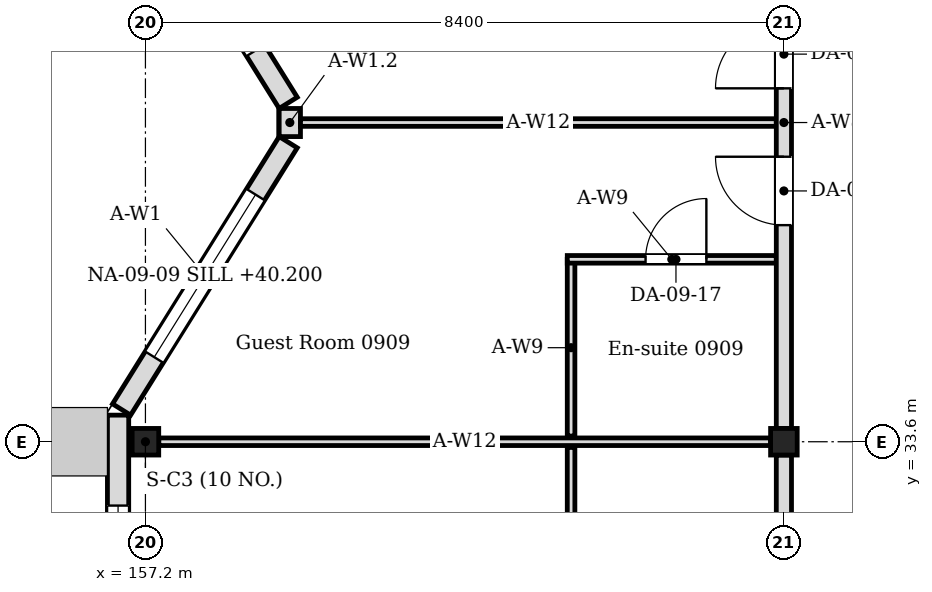
"""IFC4 building model, lengths in metres.
Left out: names, types, materials, properties, quantities, classifications, styles, units other than length and angle.
Written with IfcOpenShell. Run it as: python <this file> out.ifc"""

import sys

from ifc_helpers import new_model, si_unit, direction, frame, frame_2d, origin, origin_2d, place, context, subcontext, project, spatial, rectangle, i_section, extrude, element, fill, save


model = new_model("IFC4")
c1 = context("Model", 3, precision=1e-05, world=origin(), true_north=direction((0.0, 1.0)))
c2 = subcontext(c1, "Body", "Model", "MODEL_VIEW")
j1 = project(units=[si_unit("LENGTHUNIT", "METRE"), si_unit("PLANEANGLEUNIT", "RADIAN")], contexts=[c1])
p1 = place(None, origin())
s1 = spatial("IfcSite", under=j1, at=p1, CompositionType="ELEMENT")
p2 = place(p1, origin())
s2 = spatial("IfcBuilding", under=s1, at=p2, CompositionType="ELEMENT")
p3 = place(p2, frame((0.0, 0.0, 39.6)))
s3 = spatial("IfcBuildingStorey", under=s2, at=p3, CompositionType="ELEMENT", Elevation=39.6)
for number, where, z_axis, x_axis in (
    (1, (157.2, 33.6, 0.0), (0.0, 0.0, 1.0), (1.0, 0.0, 0.0)),
    (2, (165.6, 33.6, 0.0), (0.0, 0.0, 1.0), (1.0, 0.0, 0.0)),
):
    element("IfcColumn", number, at=place(p3, frame(where, z_axis=z_axis, x_axis=x_axis)), inside=s3, PredefinedType="COLUMN", context=c2, shape_type="SweptSolid", body=[
        extrude(i_section(OverallWidth=0.35, OverallDepth=0.35, WebThickness=0.012, FlangeThickness=0.019, FilletRadius=0.013, at=origin_2d()), origin(), (0.0, 0.0, 1.0), 4.2),
    ])
p4 = place(p3, frame((156.84, 24.85, 0.0), z_axis=(0.0, 0.0, 1.0), x_axis=(0.0, 1.0, 0.0)))
e3 = element("IfcWall", 3, at=p4, inside=s3, PredefinedType="SOLIDWALL", context=c2, shape_type="SweptSolid", body=[
    extrude(rectangle(XDim=9.1, YDim=0.28, at=frame_2d((4.55, 0.0))), origin(), (0.0, 0.0, 1.0), 4.05),
])
p5 = place(p4, frame((1.19, 0.0, 0.6)))
e4 = element("IfcOpeningElement", 4, at=p5, cuts=e3, PredefinedType="OPENING", context=c2, shape_type="SweptSolid", body=[
    extrude(rectangle(XDim=2.52, YDim=2.4, at=frame_2d((1.26, 1.2))), frame((0.0, 0.15, 0.0), z_axis=(0.0, -1.0, 0.0), x_axis=(1.0, 0.0, 0.0)), (0.0, 0.0, 1.0), 0.3),
])
p6 = place(p4, frame((5.39, 0.0, 0.6)))
e5 = element("IfcOpeningElement", 5, at=p6, cuts=e3, PredefinedType="OPENING", context=c2, shape_type="SweptSolid", body=[
    extrude(rectangle(XDim=2.52, YDim=2.4, at=frame_2d((1.26, 1.2))), frame((0.0, 0.15, 0.0), z_axis=(0.0, -1.0, 0.0), x_axis=(1.0, 0.0, 0.0)), (0.0, 0.0, 1.0), 0.3),
])
p7 = place(p3, frame((156.886, 34.024, 0.0), z_axis=(0.0, 0.0, 1.0), x_axis=(0.529018946142, 0.848610013271, 0.0)))
e6 = element("IfcWall", 6, at=p7, inside=s3, PredefinedType="SOLIDWALL", context=c2, shape_type="SweptSolid", body=[
    extrude(rectangle(XDim=4.144, YDim=0.28, at=frame_2d((2.072, 0.0))), origin(), (0.0, 0.0, 1.0), 4.05),
])
p8 = place(p7, frame((0.812, 0.0, 0.6)))
e7 = element("IfcOpeningElement", 7, at=p8, cuts=e6, PredefinedType="OPENING", context=c2, shape_type="SweptSolid", body=[
    extrude(rectangle(XDim=2.52, YDim=2.4, at=frame_2d((1.26, 1.2))), frame((0.0, 0.15, 0.0), z_axis=(0.0, -1.0, 0.0), x_axis=(1.0, 0.0, 0.0)), (0.0, 0.0, 1.0), 0.3),
])
p9 = place(p3, frame((159.079, 38.059, 0.0), z_axis=(0.0, 0.0, 1.0), x_axis=(-0.529018946142, 0.848610013271, 0.0)))
e8 = element("IfcWall", 8, at=p9, inside=s3, PredefinedType="SOLIDWALL", context=c2, shape_type="SweptSolid", body=[
    extrude(rectangle(XDim=4.144, YDim=0.28, at=frame_2d((2.072, 0.0))), origin(), (0.0, 0.0, 1.0), 4.05),
])
p10 = place(p9, frame((0.812, 0.0, 0.6)))
e9 = element("IfcOpeningElement", 9, at=p10, cuts=e8, PredefinedType="OPENING", context=c2, shape_type="SweptSolid", body=[
    extrude(rectangle(XDim=2.52, YDim=2.4, at=frame_2d((1.26, 1.2))), frame((0.0, 0.15, 0.0), z_axis=(0.0, -1.0, 0.0), x_axis=(1.0, 0.0, 0.0)), (0.0, 0.0, 1.0), 0.3),
])
p11 = place(p3, frame((159.1, 37.615, 0.0), z_axis=(0.0, 0.0, 1.0), x_axis=(0.0, 1.0, 0.0)))
e10 = element("IfcWall", 10, at=p11, inside=s3, PredefinedType="SOLIDWALL", context=c2, shape_type="SweptSolid", body=[
    extrude(rectangle(XDim=0.37, YDim=0.28, at=frame_2d((0.185, 0.0))), origin(), (0.0, 0.0, 1.0), 3.604),
])
for number, where, z_axis, x_axis in (
    (11, (162.8, 31.2, 0.0), (0.0, 0.0, 1.0), (0.0, 1.0, 0.0)),
    (12, (162.8, 33.675, 0.0), (0.0, 0.0, 1.0), (0.0, 1.0, 0.0)),
):
    element("IfcWall", number, at=place(p3, frame(where, z_axis=z_axis, x_axis=x_axis)), inside=s3, PredefinedType="PARTITIONING", context=c2, shape_type="SweptSolid", body=[
        extrude(rectangle(XDim=2.325, YDim=0.1, at=frame_2d((1.163, 0.0))), origin(), (0.0, 0.0, 1.0), 4.05),
    ])
p12 = place(p3, frame((162.75, 36.0, 0.0), z_axis=(0.0, 0.0, 1.0), x_axis=(1.0, 0.0, 0.0)))
e13 = element("IfcWall", 13, at=p12, inside=s3, PredefinedType="PARTITIONING", context=c2, shape_type="SweptSolid", body=[
    extrude(rectangle(XDim=2.75, YDim=0.1, at=frame_2d((1.375, 0.0))), origin(), (0.0, 0.0, 1.0), 4.05),
])
p13 = place(p12, frame((1.03, 0.0, 0.0)))
e14 = element("IfcOpeningElement", 14, at=p13, cuts=e13, PredefinedType="OPENING", context=c2, shape_type="SweptSolid", body=[
    extrude(rectangle(XDim=0.8, YDim=2.1, at=frame_2d((0.4, 1.05))), frame((0.0, 0.06, 0.0), z_axis=(0.0, -1.0, 0.0), x_axis=(1.0, 0.0, 0.0)), (0.0, 0.0, 1.0), 0.12),
])
p14 = place(p3, frame((157.375, 33.6, 0.0), z_axis=(0.0, 0.0, 1.0), x_axis=(1.0, 0.0, 0.0)))
e15 = element("IfcWall", 15, at=p14, inside=s3, PredefinedType="PARTITIONING", context=c2, shape_type="SweptSolid", body=[
    extrude(rectangle(XDim=8.05, YDim=0.1, at=frame_2d((4.025, 0.0))), origin(), (0.0, 0.0, 1.0), 3.604),
])
p15 = place(p3, frame((159.24, 37.8, 0.0), z_axis=(0.0, 0.0, 1.0), x_axis=(1.0, 0.0, 0.0)))
e16 = element("IfcWall", 16, at=p15, inside=s3, PredefinedType="PARTITIONING", context=c2, shape_type="SweptSolid", body=[
    extrude(rectangle(XDim=6.26, YDim=0.1, at=frame_2d((3.13, 0.0))), origin(), (0.0, 0.0, 1.0), 3.604),
])
p16 = place(p3, frame((165.6, 25.375, 0.0), z_axis=(0.0, 0.0, 1.0), x_axis=(0.0, 1.0, 0.0)))
e17 = element("IfcWall", 17, at=p16, inside=s3, PredefinedType="PARTITIONING", context=c2, shape_type="SweptSolid", body=[
    extrude(rectangle(XDim=8.05, YDim=0.2, at=frame_2d((4.025, 0.0))), origin(), (0.0, 0.0, 1.0), 3.45),
])
p17 = place(p16, frame((2.675, 0.0, 0.0)))
e18 = element("IfcOpeningElement", 18, at=p17, cuts=e17, PredefinedType="OPENING", context=c2, shape_type="SweptSolid", body=[
    extrude(rectangle(XDim=0.9, YDim=2.1, at=frame_2d((0.45, 1.05))), frame((0.0, 0.11, 0.0), z_axis=(0.0, -1.0, 0.0), x_axis=(1.0, 0.0, 0.0)), (0.0, 0.0, 1.0), 0.22),
])
p18 = place(p16, frame((4.475, 0.0, 0.0)))
e19 = element("IfcOpeningElement", 19, at=p18, cuts=e17, PredefinedType="OPENING", context=c2, shape_type="SweptSolid", body=[
    extrude(rectangle(XDim=0.9, YDim=2.1, at=frame_2d((0.45, 1.05))), frame((0.0, 0.11, 0.0), z_axis=(0.0, -1.0, 0.0), x_axis=(1.0, 0.0, 0.0)), (0.0, 0.0, 1.0), 0.22),
])
p19 = place(p3, frame((165.6, 33.775, 0.0), z_axis=(0.0, 0.0, 1.0), x_axis=(0.0, 1.0, 0.0)))
e20 = element("IfcWall", 20, at=p19, inside=s3, PredefinedType="PARTITIONING", context=c2, shape_type="SweptSolid", body=[
    extrude(rectangle(XDim=8.05, YDim=0.2, at=frame_2d((4.025, 0.0))), origin(), (0.0, 0.0, 1.0), 3.45),
])
p20 = place(p19, frame((2.675, 0.0, 0.0)))
e21 = element("IfcOpeningElement", 21, at=p20, cuts=e20, PredefinedType="OPENING", context=c2, shape_type="SweptSolid", body=[
    extrude(rectangle(XDim=0.9, YDim=2.1, at=frame_2d((0.45, 1.05))), frame((0.0, 0.11, 0.0), z_axis=(0.0, -1.0, 0.0), x_axis=(1.0, 0.0, 0.0)), (0.0, 0.0, 1.0), 0.22),
])
p21 = place(p19, frame((4.475, 0.0, 0.0)))
e22 = element("IfcOpeningElement", 22, at=p21, cuts=e20, PredefinedType="OPENING", context=c2, shape_type="SweptSolid", body=[
    extrude(rectangle(XDim=0.9, YDim=2.1, at=frame_2d((0.45, 1.05))), frame((0.0, 0.11, 0.0), z_axis=(0.0, -1.0, 0.0), x_axis=(1.0, 0.0, 0.0)), (0.0, 0.0, 1.0), 0.22),
])
p22 = place(p6, origin())
e23 = element("IfcWindow", 23, at=p22, inside=s3, PartitioningType="SINGLE_PANEL", PredefinedType="WINDOW", context=c2, shape_type="SweptSolid", body=[
    extrude(rectangle(XDim=2.52, YDim=2.4, at=frame_2d((1.26, 1.2))), frame((0.0, 0.03, 0.0), z_axis=(0.0, -1.0, 0.0), x_axis=(1.0, 0.0, 0.0)), (0.0, 0.0, 1.0), 0.06),
])
fill(e5, e23)
p23 = place(p8, origin())
e24 = element("IfcWindow", 24, at=p23, inside=s3, PartitioningType="SINGLE_PANEL", PredefinedType="WINDOW", context=c2, shape_type="SweptSolid", body=[
    extrude(rectangle(XDim=2.52, YDim=2.4, at=frame_2d((1.26, 1.2))), frame((0.0, 0.03, 0.0), z_axis=(0.0, -1.0, 0.0), x_axis=(1.0, 0.0, 0.0)), (0.0, 0.0, 1.0), 0.06),
])
fill(e7, e24)
p24 = place(p13, origin())
e25 = element("IfcDoor", 25, at=p24, inside=s3, OperationType="SINGLE_SWING_RIGHT", PredefinedType="DOOR", context=c2, shape_type="SweptSolid", body=[
    extrude(rectangle(XDim=0.8, YDim=2.1, at=frame_2d((0.4, 1.05))), frame((0.0, 0.025, 0.0), z_axis=(0.0, -1.0, 0.0), x_axis=(1.0, 0.0, 0.0)), (0.0, 0.0, 1.0), 0.05),
])
fill(e14, e25)
p25 = place(p20, origin())
e26 = element("IfcDoor", 26, at=p25, inside=s3, OperationType="SINGLE_SWING_RIGHT", PredefinedType="DOOR", context=c2, shape_type="SweptSolid", body=[
    extrude(rectangle(XDim=0.9, YDim=2.1, at=frame_2d((0.45, 1.05))), frame((0.0, 0.025, 0.0), z_axis=(0.0, -1.0, 0.0), x_axis=(1.0, 0.0, 0.0)), (0.0, 0.0, 1.0), 0.05),
])
fill(e21, e26)
p26 = place(p21, origin())
e27 = element("IfcDoor", 27, at=p26, inside=s3, OperationType="SINGLE_SWING_LEFT", PredefinedType="DOOR", context=c2, shape_type="SweptSolid", body=[
    extrude(rectangle(XDim=0.9, YDim=2.1, at=frame_2d((0.45, 1.05))), frame((0.0, 0.025, 0.0), z_axis=(0.0, -1.0, 0.0), x_axis=(1.0, 0.0, 0.0)), (0.0, 0.0, 1.0), 0.05),
])
fill(e22, e27)
save(model, sys.argv[1])
